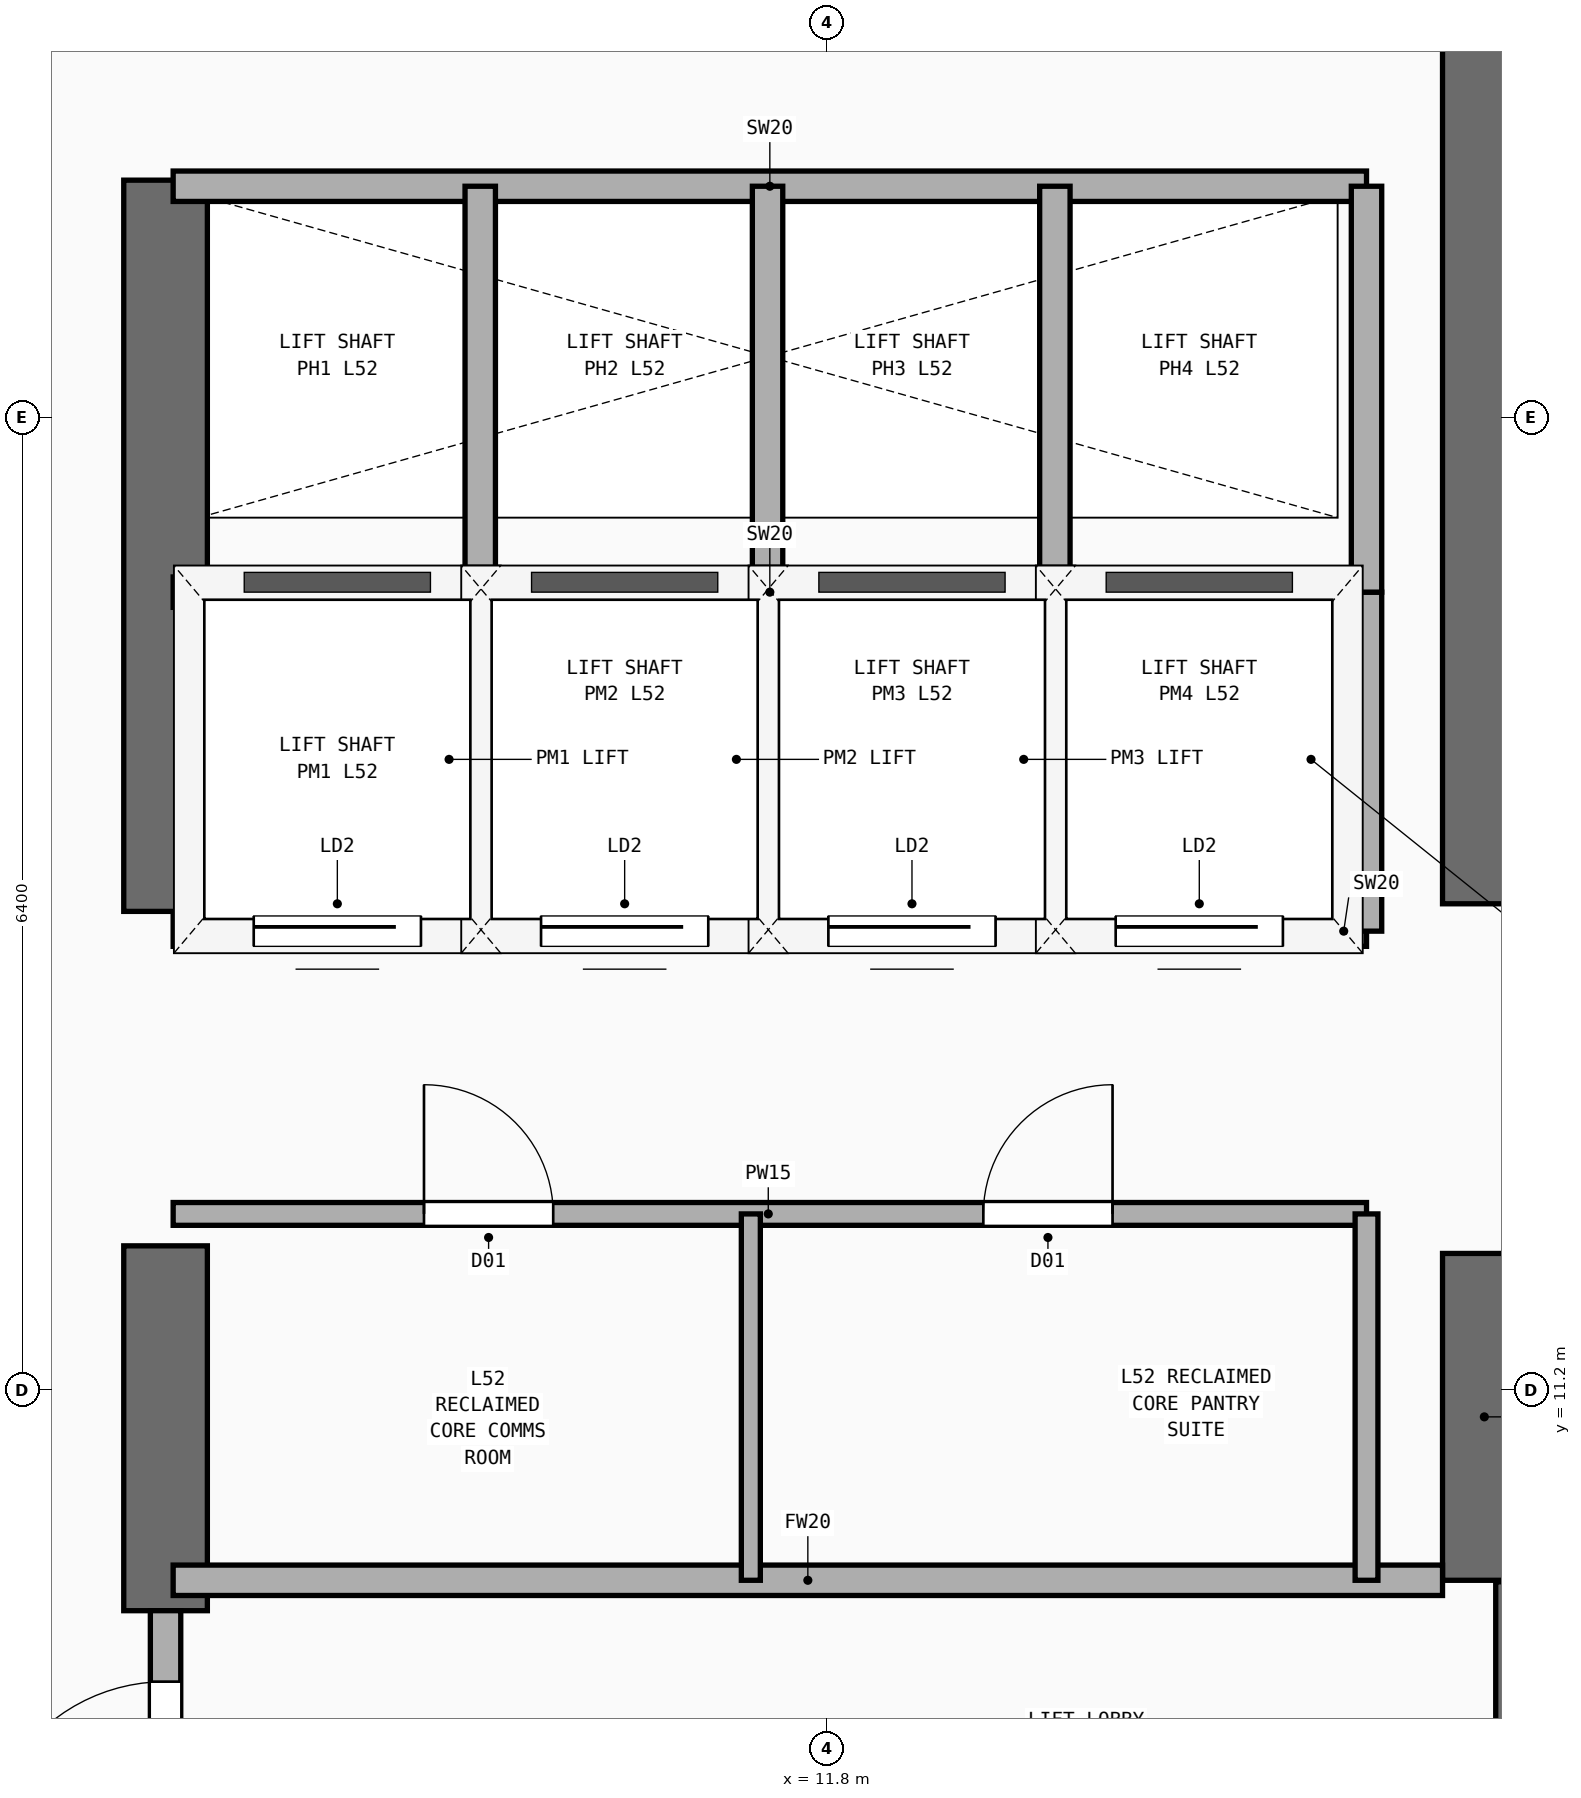
"""IFC4 building model, lengths in metres.
Left out: names, types, materials, properties, quantities, classifications, styles, units other than length and angle.
Written with IfcOpenShell. Run it as: python <this file> out.ifc"""

import sys

from ifc_helpers import new_model, si_unit, direction, frame, frame_2d, origin, place, context, subcontext, project, spatial, rectangle, extrude, element, fill, save


model = new_model("IFC4")
c1 = context("Model", 3, precision=1e-05, world=origin(), true_north=direction((0.0, 1.0)))
c2 = subcontext(c1, "Body", "Model", "MODEL_VIEW")
j1 = project(units=[si_unit("LENGTHUNIT", "METRE"), si_unit("PLANEANGLEUNIT", "RADIAN")], contexts=[c1])
p1 = place(None, origin())
s1 = spatial("IfcSite", under=j1, at=p1, CompositionType="ELEMENT")
p2 = place(p1, origin())
s2 = spatial("IfcBuilding", under=s1, at=p2, CompositionType="ELEMENT")
p3 = place(p2, frame((0.0, 0.0, 204.5)))
s3 = spatial("IfcBuildingStorey", under=s2, at=p3, CompositionType="ELEMENT", Elevation=204.5)
p4 = place(p3, frame((7.45, 9.75, 0.0), z_axis=(0.0, 0.0, 1.0), x_axis=(0.0, 1.0, 0.0)))
e1 = element("IfcWall", 1, at=p4, inside=s3, PredefinedType="SHEAR", context=c2, shape_type="SweptSolid", body=[
    extrude(rectangle(XDim=2.4, YDim=0.55, at=frame_2d((1.2, 0.0))), origin(), (0.0, 0.0, 1.0), 3.56),
])
p5 = place(p3, frame((7.45, 14.35, 0.0), z_axis=(0.0, 0.0, 1.0), x_axis=(0.0, 1.0, 0.0)))
e2 = element("IfcWall", 2, at=p5, inside=s3, PredefinedType="SHEAR", context=c2, shape_type="SweptSolid", body=[
    extrude(rectangle(XDim=4.81, YDim=0.55, at=frame_2d((2.405, 0.0))), origin(), (0.0, 0.0, 1.0), 3.56),
])
p6 = place(p3, frame((16.125, 9.95, 0.0), z_axis=(0.0, 0.0, 1.0), x_axis=(0.0, 1.0, 0.0)))
e3 = element("IfcWall", 3, at=p6, inside=s3, PredefinedType="SHEAR", context=c2, shape_type="SweptSolid", body=[
    extrude(rectangle(XDim=2.15, YDim=0.55, at=frame_2d((1.075, 0.0))), origin(), (0.0, 0.0, 1.0), 3.56),
])
p7 = place(p3, frame((16.125, 14.4, 0.0), z_axis=(0.0, 0.0, 1.0), x_axis=(0.0, 1.0, 0.0)))
e4 = element("IfcWall", 4, at=p7, inside=s3, PredefinedType="SHEAR", context=c2, shape_type="SweptSolid", body=[
    extrude(rectangle(XDim=9.1, YDim=0.55, at=frame_2d((4.55, 0.0))), origin(), (0.0, 0.0, 1.0), 3.56),
])
p8 = place(p3, frame((16.3, 7.36, 0.0), z_axis=(0.0, 0.0, 1.0), x_axis=(0.0, 1.0, 0.0)))
e5 = element("IfcWall", 5, at=p8, inside=s3, PredefinedType="SHEAR", context=c2, shape_type="SweptSolid", body=[
    extrude(rectangle(XDim=2.58, YDim=0.2, at=frame_2d((1.29, 0.0))), origin(), (0.0, 0.0, 1.0), 3.56),
])
p9 = place(p3, frame((7.5, 9.95, 0.0), z_axis=(0.0, 0.0, 1.0), x_axis=(1.0, 0.0, 0.0)))
e6 = element("IfcWall", 6, at=p9, inside=s3, PredefinedType="PARTITIONING", context=c2, shape_type="SweptSolid", body=[
    extrude(rectangle(XDim=8.35, YDim=0.2, at=frame_2d((4.175, 0.0))), origin(), (0.0, 0.0, 1.0), 3.56),
])
p10 = place(p3, frame((7.45, 7.45, 0.0), z_axis=(0.0, 0.0, 1.0), x_axis=(0.0, 1.0, 0.0)))
e7 = element("IfcWall", 7, at=p10, inside=s3, PredefinedType="PARTITIONING", context=c2, shape_type="SweptSolid", body=[
    extrude(rectangle(XDim=2.3, YDim=0.2, at=frame_2d((1.15, 0.0))), origin(), (0.0, 0.0, 1.0), 2.54),
])
p11 = place(p10, frame((0.633, 0.0, 0.0)))
e8 = element("IfcOpeningElement", 8, at=p11, cuts=e7, PredefinedType="OPENING", context=c2, shape_type="SweptSolid", body=[
    extrude(rectangle(XDim=1.2, YDim=2.25, at=frame_2d((0.6, 1.125))), frame((0.0, 0.11, 0.0), z_axis=(0.0, -1.0, 0.0), x_axis=(1.0, 0.0, 0.0)), (0.0, 0.0, 1.0), 0.22),
])
p12 = place(p3, frame((7.5, 12.36, 0.0), z_axis=(0.0, 0.0, 1.0), x_axis=(1.0, 0.0, 0.0)))
e9 = element("IfcWall", 9, at=p12, inside=s3, PredefinedType="PARTITIONING", context=c2, shape_type="SweptSolid", body=[
    extrude(rectangle(XDim=7.85, YDim=0.15, at=frame_2d((3.925, 0.0))), origin(), (0.0, 0.0, 1.0), 3.56),
])
p13 = place(p12, frame((1.65, 0.0, 0.0)))
e10 = element("IfcOpeningElement", 10, at=p13, cuts=e9, PredefinedType="OPENING", context=c2, shape_type="SweptSolid", body=[
    extrude(rectangle(XDim=0.85, YDim=2.15, at=frame_2d((0.425, 1.075))), frame((0.0, 0.085, 0.0), z_axis=(0.0, -1.0, 0.0), x_axis=(1.0, 0.0, 0.0)), (0.0, 0.0, 1.0), 0.17),
])
p14 = place(p12, frame((5.329, 0.0, 0.0)))
e11 = element("IfcOpeningElement", 11, at=p14, cuts=e9, PredefinedType="OPENING", context=c2, shape_type="SweptSolid", body=[
    extrude(rectangle(XDim=0.85, YDim=2.15, at=frame_2d((0.425, 1.075))), frame((0.0, 0.085, 0.0), z_axis=(0.0, -1.0, 0.0), x_axis=(1.0, 0.0, 0.0)), (0.0, 0.0, 1.0), 0.17),
])
p15 = place(p3, frame((15.35, 9.95, 0.0), z_axis=(0.0, 0.0, 1.0), x_axis=(0.0, 1.0, 0.0)))
e12 = element("IfcWall", 12, at=p15, inside=s3, PredefinedType="PARTITIONING", context=c2, shape_type="SweptSolid", body=[
    extrude(rectangle(XDim=2.41, YDim=0.15, at=frame_2d((1.205, 0.0))), origin(), (0.0, 0.0, 1.0), 3.56),
])
p16 = place(p3, frame((11.3, 9.95, 0.0), z_axis=(0.0, 0.0, 1.0), x_axis=(0.0, 1.0, 0.0)))
e13 = element("IfcWall", 13, at=p16, inside=s3, PredefinedType="PARTITIONING", context=c2, shape_type="SweptSolid", body=[
    extrude(rectangle(XDim=2.41, YDim=0.125, at=frame_2d((1.205, 0.0))), origin(), (0.0, 0.0, 1.0), 3.56),
])
p17 = place(p3, frame((7.5, 14.22, 0.0), z_axis=(0.0, 0.0, 1.0), x_axis=(1.0, 0.0, 0.0)))
e14 = element("IfcWall", 14, at=p17, inside=s3, PredefinedType="PARTITIONING", context=c2, shape_type="SweptSolid", body=[
    extrude(rectangle(XDim=7.85, YDim=0.2, at=frame_2d((3.925, 0.0))), origin(), (0.0, 0.0, 1.0), 3.56),
])
p18 = place(p17, frame((0.53, 0.0, 0.0)))
e15 = element("IfcOpeningElement", 15, at=p18, cuts=e14, PredefinedType="OPENING", context=c2, shape_type="SweptSolid", body=[
    extrude(rectangle(XDim=1.1, YDim=2.2, at=frame_2d((0.55, 1.1))), frame((0.0, 0.11, 0.0), z_axis=(0.0, -1.0, 0.0), x_axis=(1.0, 0.0, 0.0)), (0.0, 0.0, 1.0), 0.22),
])
p19 = place(p17, frame((2.42, 0.0, 0.0)))
e16 = element("IfcOpeningElement", 16, at=p19, cuts=e14, PredefinedType="OPENING", context=c2, shape_type="SweptSolid", body=[
    extrude(rectangle(XDim=1.1, YDim=2.2, at=frame_2d((0.55, 1.1))), frame((0.0, 0.11, 0.0), z_axis=(0.0, -1.0, 0.0), x_axis=(1.0, 0.0, 0.0)), (0.0, 0.0, 1.0), 0.22),
])
p20 = place(p17, frame((4.31, 0.0, 0.0)))
e17 = element("IfcOpeningElement", 17, at=p20, cuts=e14, PredefinedType="OPENING", context=c2, shape_type="SweptSolid", body=[
    extrude(rectangle(XDim=1.1, YDim=2.2, at=frame_2d((0.55, 1.1))), frame((0.0, 0.11, 0.0), z_axis=(0.0, -1.0, 0.0), x_axis=(1.0, 0.0, 0.0)), (0.0, 0.0, 1.0), 0.22),
])
p21 = place(p17, frame((6.2, 0.0, 0.0)))
e18 = element("IfcOpeningElement", 18, at=p21, cuts=e14, PredefinedType="OPENING", context=c2, shape_type="SweptSolid", body=[
    extrude(rectangle(XDim=1.1, YDim=2.2, at=frame_2d((0.55, 1.1))), frame((0.0, 0.11, 0.0), z_axis=(0.0, -1.0, 0.0), x_axis=(1.0, 0.0, 0.0)), (0.0, 0.0, 1.0), 0.22),
])
p22 = place(p3, frame((7.5, 16.45, 0.0), z_axis=(0.0, 0.0, 1.0), x_axis=(1.0, 0.0, 0.0)))
e19 = element("IfcWall", 19, at=p22, inside=s3, PredefinedType="PARTITIONING", context=c2, shape_type="SweptSolid", body=[
    extrude(rectangle(XDim=7.85, YDim=0.2, at=frame_2d((3.925, 0.0))), origin(), (0.0, 0.0, 1.0), 3.56),
])
for number, where, z_axis, x_axis in (
    (20, (15.35, 14.22, 0.0), (0.0, 0.0, 1.0), (0.0, 1.0, 0.0)),
    (21, (9.52, 14.22, 0.0), (0.0, 0.0, 1.0), (0.0, 1.0, 0.0)),
    (22, (11.41, 14.22, 0.0), (0.0, 0.0, 1.0), (0.0, 1.0, 0.0)),
    (23, (13.3, 14.22, 0.0), (0.0, 0.0, 1.0), (0.0, 1.0, 0.0)),
):
    element("IfcWall", number, at=place(p3, frame(where, z_axis=z_axis, x_axis=x_axis)), inside=s3, PredefinedType="PARTITIONING", context=c2, shape_type="SweptSolid", body=[
        extrude(rectangle(XDim=2.23, YDim=0.2, at=frame_2d((1.115, 0.0))), origin(), (0.0, 0.0, 1.0), 3.56),
    ])
p23 = place(p3, frame((7.5, 19.12, 0.0), z_axis=(0.0, 0.0, 1.0), x_axis=(1.0, 0.0, 0.0)))
e24 = element("IfcWall", 24, at=p23, inside=s3, PredefinedType="PARTITIONING", context=c2, shape_type="SweptSolid", body=[
    extrude(rectangle(XDim=7.85, YDim=0.2, at=frame_2d((3.925, 0.0))), origin(), (0.0, 0.0, 1.0), 3.56),
])
for number, where, z_axis, x_axis in (
    (25, (15.35, 16.45, 0.0), (0.0, 0.0, 1.0), (0.0, 1.0, 0.0)),
    (26, (9.52, 16.45, 0.0), (0.0, 0.0, 1.0), (0.0, 1.0, 0.0)),
    (27, (11.41, 16.45, 0.0), (0.0, 0.0, 1.0), (0.0, 1.0, 0.0)),
    (28, (13.3, 16.45, 0.0), (0.0, 0.0, 1.0), (0.0, 1.0, 0.0)),
):
    element("IfcWall", number, at=place(p3, frame(where, z_axis=z_axis, x_axis=x_axis)), inside=s3, PredefinedType="PARTITIONING", context=c2, shape_type="SweptSolid", body=[
        extrude(rectangle(XDim=2.67, YDim=0.2, at=frame_2d((1.335, 0.0))), origin(), (0.0, 0.0, 1.0), 3.56),
    ])
p24 = place(p11, frame((1.2, 0.0, 0.0), z_axis=(0.0, 0.0, 1.0), x_axis=(-1.0, 0.0, 0.0)))
e29 = element("IfcDoor", 29, at=p24, inside=s3, OperationType="SINGLE_SWING_RIGHT", PredefinedType="DOOR", context=c2, shape_type="SweptSolid", body=[
    extrude(rectangle(XDim=1.2, YDim=2.25, at=frame_2d((0.6, 1.125))), frame((0.0, 0.025, 0.0), z_axis=(0.0, -1.0, 0.0), x_axis=(1.0, 0.0, 0.0)), (0.0, 0.0, 1.0), 0.05),
])
fill(e8, e29)
p25 = place(p13, origin())
e30 = element("IfcDoor", 30, at=p25, inside=s3, OperationType="SINGLE_SWING_LEFT", PredefinedType="DOOR", context=c2, shape_type="SweptSolid", body=[
    extrude(rectangle(XDim=0.85, YDim=2.15, at=frame_2d((0.425, 1.075))), frame((0.0, 0.025, 0.0), z_axis=(0.0, -1.0, 0.0), x_axis=(1.0, 0.0, 0.0)), (0.0, 0.0, 1.0), 0.05),
])
fill(e10, e30)
p26 = place(p14, origin())
e31 = element("IfcDoor", 31, at=p26, inside=s3, OperationType="SINGLE_SWING_RIGHT", PredefinedType="DOOR", context=c2, shape_type="SweptSolid", body=[
    extrude(rectangle(XDim=0.85, YDim=2.15, at=frame_2d((0.425, 1.075))), frame((0.0, 0.025, 0.0), z_axis=(0.0, -1.0, 0.0), x_axis=(1.0, 0.0, 0.0)), (0.0, 0.0, 1.0), 0.05),
])
fill(e11, e31)
p27 = place(p18, frame((1.1, 0.0, 0.0), z_axis=(0.0, 0.0, 1.0), x_axis=(-1.0, 0.0, 0.0)))
e32 = element("IfcDoor", 32, at=p27, inside=s3, OperationType="SLIDING_TO_LEFT", PredefinedType="DOOR", context=c2, shape_type="SweptSolid", body=[
    extrude(rectangle(XDim=1.1, YDim=2.2, at=frame_2d((0.55, 1.1))), frame((0.0, 0.025, 0.0), z_axis=(0.0, -1.0, 0.0), x_axis=(1.0, 0.0, 0.0)), (0.0, 0.0, 1.0), 0.05),
])
fill(e15, e32)
p28 = place(p19, frame((1.1, 0.0, 0.0), z_axis=(0.0, 0.0, 1.0), x_axis=(-1.0, 0.0, 0.0)))
e33 = element("IfcDoor", 33, at=p28, inside=s3, OperationType="SLIDING_TO_LEFT", PredefinedType="DOOR", context=c2, shape_type="SweptSolid", body=[
    extrude(rectangle(XDim=1.1, YDim=2.2, at=frame_2d((0.55, 1.1))), frame((0.0, 0.025, 0.0), z_axis=(0.0, -1.0, 0.0), x_axis=(1.0, 0.0, 0.0)), (0.0, 0.0, 1.0), 0.05),
])
fill(e16, e33)
p29 = place(p20, frame((1.1, 0.0, 0.0), z_axis=(0.0, 0.0, 1.0), x_axis=(-1.0, 0.0, 0.0)))
e34 = element("IfcDoor", 34, at=p29, inside=s3, OperationType="SLIDING_TO_LEFT", PredefinedType="DOOR", context=c2, shape_type="SweptSolid", body=[
    extrude(rectangle(XDim=1.1, YDim=2.2, at=frame_2d((0.55, 1.1))), frame((0.0, 0.025, 0.0), z_axis=(0.0, -1.0, 0.0), x_axis=(1.0, 0.0, 0.0)), (0.0, 0.0, 1.0), 0.05),
])
fill(e17, e34)
p30 = place(p21, frame((1.1, 0.0, 0.0), z_axis=(0.0, 0.0, 1.0), x_axis=(-1.0, 0.0, 0.0)))
e35 = element("IfcDoor", 35, at=p30, inside=s3, OperationType="SLIDING_TO_LEFT", PredefinedType="DOOR", context=c2, shape_type="SweptSolid", body=[
    extrude(rectangle(XDim=1.1, YDim=2.2, at=frame_2d((0.55, 1.1))), frame((0.0, 0.025, 0.0), z_axis=(0.0, -1.0, 0.0), x_axis=(1.0, 0.0, 0.0)), (0.0, 0.0, 1.0), 0.05),
])
fill(e18, e35)
save(model, sys.argv[1])
